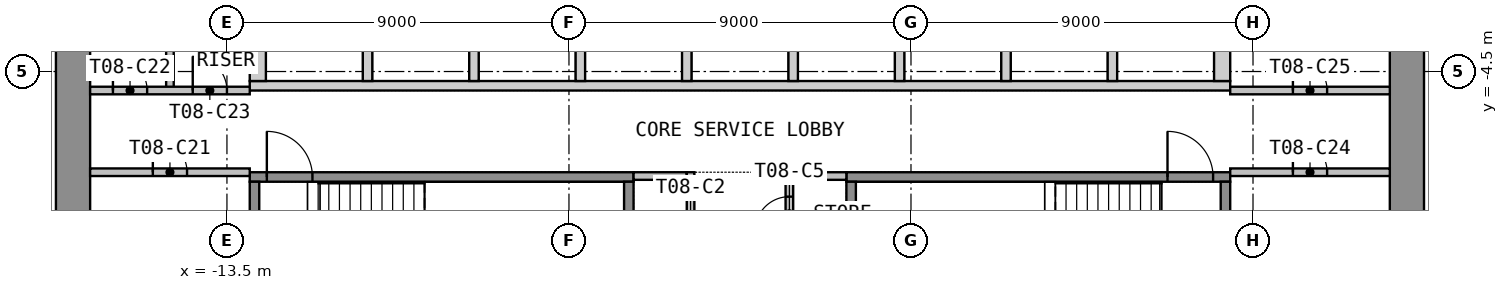
"""IFC4 building model, lengths in metres.
Left out: names, types, materials, properties, quantities, classifications, styles, units other than length and angle.
Written with IfcOpenShell. Run it as: python <this file> out.ifc"""

import sys

from ifc_helpers import new_model, si_unit, direction, frame, frame_2d, origin, place, context, subcontext, project, spatial, polyline, rectangle, outline, extrude, element, fill, save


model = new_model("IFC4")
c1 = context("Model", 3, precision=1e-05, world=origin(), true_north=direction((0.0, 1.0)))
c2 = subcontext(c1, "Body", "Model", "MODEL_VIEW")
j1 = project(units=[si_unit("LENGTHUNIT", "METRE"), si_unit("PLANEANGLEUNIT", "RADIAN")], contexts=[c1])
p1 = place(None, origin())
s1 = spatial("IfcSite", under=j1, at=p1, CompositionType="ELEMENT")
p2 = place(p1, origin())
s2 = spatial("IfcBuilding", under=s1, at=p2, CompositionType="ELEMENT")
p3 = place(p2, frame((0.0, 0.0, 116.4)))
s3 = spatial("IfcBuildingStorey", under=s2, at=p3, CompositionType="ELEMENT", Elevation=116.4)
p4 = place(p3, frame((-17.55, -12.6, 0.0), z_axis=(0.0, 0.0, 1.0), x_axis=(0.0, 1.0, 0.0)))
e1 = element("IfcWall", 1, at=p4, inside=s3, PredefinedType="SHEAR", context=c2, shape_type="SweptSolid", body=[
    extrude(rectangle(XDim=25.2, YDim=0.9, at=frame_2d((12.6, 0.0))), origin(), (0.0, 0.0, 1.0), 3.525),
])
p5 = place(p4, frame((11.4, 0.0, 0.0)))
e2 = element("IfcOpeningElement", 2, at=p5, cuts=e1, PredefinedType="OPENING", context=c2, shape_type="SweptSolid", body=[
    extrude(rectangle(XDim=2.4, YDim=2.1, at=frame_2d((1.2, 1.05))), frame((0.0, 0.46, 0.0), z_axis=(0.0, -1.0, 0.0), x_axis=(1.0, 0.0, 0.0)), (0.0, 0.0, 1.0), 0.92),
])
p6 = place(p3, frame((17.55, -12.6, 0.0), z_axis=(0.0, 0.0, 1.0), x_axis=(0.0, 1.0, 0.0)))
e3 = element("IfcWall", 3, at=p6, inside=s3, PredefinedType="SHEAR", context=c2, shape_type="SweptSolid", body=[
    extrude(rectangle(XDim=25.2, YDim=0.9, at=frame_2d((12.6, 0.0))), origin(), (0.0, 0.0, 1.0), 3.525),
])
p7 = place(p6, frame((11.4, 0.0, 0.0)))
e4 = element("IfcOpeningElement", 4, at=p7, cuts=e3, PredefinedType="OPENING", context=c2, shape_type="SweptSolid", body=[
    extrude(rectangle(XDim=2.4, YDim=2.1, at=frame_2d((1.2, 1.05))), frame((0.0, 0.46, 0.0), z_axis=(0.0, -1.0, 0.0), x_axis=(1.0, 0.0, 0.0)), (0.0, 0.0, 1.0), 0.92),
])
p8 = place(p3, origin())
e5 = element("IfcWall", 5, at=p8, inside=s3, PredefinedType="SHEAR", context=c2, shape_type="SweptSolid", body=[
    extrude(outline(polyline([(-12.9, -5.0), (12.9, -5.0), (12.9, -4.75), (-12.9, -4.75), (-12.9, -5.0)])), origin(), (0.0, 0.0, 1.0), 3.525),
])
p9 = place(p3, origin())
e6 = element("IfcWall", 6, at=p9, inside=s3, PredefinedType="SHEAR", context=c2, shape_type="SweptSolid", body=[
    extrude(outline(polyline([(-12.9, -4.75), (-12.475, -4.75), (-12.475, -2.05), (-12.9, -2.05), (-12.9, -4.75)])), origin(), (0.0, 0.0, 1.0), 3.525),
])
p10 = place(p3, origin())
e7 = element("IfcWall", 7, at=p10, inside=s3, PredefinedType="SHEAR", context=c2, shape_type="SweptSolid", body=[
    extrude(outline(polyline([(-9.925, -4.75), (-9.675, -4.75), (-9.675, -2.05), (-9.925, -2.05), (-9.925, -4.75)])), origin(), (0.0, 0.0, 1.0), 3.525),
])
p11 = place(p3, origin())
e8 = element("IfcWall", 8, at=p11, inside=s3, PredefinedType="SHEAR", context=c2, shape_type="SweptSolid", body=[
    extrude(outline(polyline([(-7.125, -4.75), (-6.875, -4.75), (-6.875, -2.05), (-7.125, -2.05), (-7.125, -4.75)])), origin(), (0.0, 0.0, 1.0), 3.525),
])
p12 = place(p3, origin())
e9 = element("IfcWall", 9, at=p12, inside=s3, PredefinedType="SHEAR", context=c2, shape_type="SweptSolid", body=[
    extrude(outline(polyline([(-4.325, -4.75), (-4.075, -4.75), (-4.075, -2.05), (-4.325, -2.05), (-4.325, -4.75)])), origin(), (0.0, 0.0, 1.0), 3.525),
])
p13 = place(p3, origin())
e10 = element("IfcWall", 10, at=p13, inside=s3, PredefinedType="SHEAR", context=c2, shape_type="SweptSolid", body=[
    extrude(outline(polyline([(-1.525, -4.75), (-1.275, -4.75), (-1.275, -2.05), (-1.525, -2.05), (-1.525, -4.75)])), origin(), (0.0, 0.0, 1.0), 3.525),
])
p14 = place(p3, origin())
e11 = element("IfcWall", 11, at=p14, inside=s3, PredefinedType="SHEAR", context=c2, shape_type="SweptSolid", body=[
    extrude(outline(polyline([(1.275, -4.75), (1.525, -4.75), (1.525, -2.05), (1.275, -2.05), (1.275, -4.75)])), origin(), (0.0, 0.0, 1.0), 3.525),
])
p15 = place(p3, origin())
e12 = element("IfcWall", 12, at=p15, inside=s3, PredefinedType="SHEAR", context=c2, shape_type="SweptSolid", body=[
    extrude(outline(polyline([(4.075, -4.75), (4.325, -4.75), (4.325, -2.05), (4.075, -2.05), (4.075, -4.75)])), origin(), (0.0, 0.0, 1.0), 3.525),
])
p16 = place(p3, origin())
e13 = element("IfcWall", 13, at=p16, inside=s3, PredefinedType="SHEAR", context=c2, shape_type="SweptSolid", body=[
    extrude(outline(polyline([(6.875, -4.75), (7.125, -4.75), (7.125, -2.05), (6.875, -2.05), (6.875, -4.75)])), origin(), (0.0, 0.0, 1.0), 3.525),
])
p17 = place(p3, origin())
e14 = element("IfcWall", 14, at=p17, inside=s3, PredefinedType="SHEAR", context=c2, shape_type="SweptSolid", body=[
    extrude(outline(polyline([(9.675, -4.75), (9.925, -4.75), (9.925, -2.05), (9.675, -2.05), (9.675, -4.75)])), origin(), (0.0, 0.0, 1.0), 3.525),
])
p18 = place(p3, origin())
e15 = element("IfcWall", 15, at=p18, inside=s3, PredefinedType="SHEAR", context=c2, shape_type="SweptSolid", body=[
    extrude(outline(polyline([(12.475, -4.75), (12.9, -4.75), (12.9, -2.05), (12.475, -2.05), (12.475, -4.75)])), origin(), (0.0, 0.0, 1.0), 3.525),
])
p19 = place(p3, frame((-12.9, -7.275, 0.0), z_axis=(0.0, 0.0, 1.0), x_axis=(1.0, 0.0, 0.0)))
e16 = element("IfcWall", 16, at=p19, inside=s3, PredefinedType="SHEAR", context=c2, shape_type="SweptSolid", body=[
    extrude(rectangle(XDim=10.1, YDim=0.25, at=frame_2d((5.05, 0.0))), origin(), (0.0, 0.0, 1.0), 3.525),
])
p20 = place(p19, frame((0.45, 0.0, 0.0)))
e17 = element("IfcOpeningElement", 17, at=p20, cuts=e16, PredefinedType="OPENING", context=c2, shape_type="SweptSolid", body=[
    extrude(rectangle(XDim=1.2, YDim=2.1, at=frame_2d((0.6, 1.05))), frame((0.0, 0.135, 0.0), z_axis=(0.0, -1.0, 0.0), x_axis=(1.0, 0.0, 0.0)), (0.0, 0.0, 1.0), 0.27),
])
for number, where, z_axis, x_axis in (
    (18, (-12.775, -10.65, 0.0), (0.0, 0.0, 1.0), (0.0, 1.0, 0.0)),
    (19, (-2.925, -10.65, 0.0), (0.0, 0.0, 1.0), (0.0, 1.0, 0.0)),
):
    element("IfcWall", number, at=place(p3, frame(where, z_axis=z_axis, x_axis=x_axis)), inside=s3, PredefinedType="SHEAR", context=c2, shape_type="SweptSolid", body=[
        extrude(rectangle(XDim=3.25, YDim=0.25, at=frame_2d((1.625, 0.0))), origin(), (0.0, 0.0, 1.0), 3.525),
    ])
p21 = place(p3, frame((2.8, -7.275, 0.0), z_axis=(0.0, 0.0, 1.0), x_axis=(1.0, 0.0, 0.0)))
e20 = element("IfcWall", 20, at=p21, inside=s3, PredefinedType="SHEAR", context=c2, shape_type="SweptSolid", body=[
    extrude(rectangle(XDim=10.1, YDim=0.25, at=frame_2d((5.05, 0.0))), origin(), (0.0, 0.0, 1.0), 3.525),
])
p22 = place(p21, frame((8.45, 0.0, 0.0)))
e21 = element("IfcOpeningElement", 21, at=p22, cuts=e20, PredefinedType="OPENING", context=c2, shape_type="SweptSolid", body=[
    extrude(rectangle(XDim=1.2, YDim=2.1, at=frame_2d((0.6, 1.05))), frame((0.0, 0.135, 0.0), z_axis=(0.0, -1.0, 0.0), x_axis=(1.0, 0.0, 0.0)), (0.0, 0.0, 1.0), 0.27),
])
for number, where, z_axis, x_axis in (
    (22, (2.925, -10.65, 0.0), (0.0, 0.0, 1.0), (0.0, 1.0, 0.0)),
    (23, (12.775, -10.65, 0.0), (0.0, 0.0, 1.0), (0.0, 1.0, 0.0)),
):
    element("IfcWall", number, at=place(p3, frame(where, z_axis=z_axis, x_axis=x_axis)), inside=s3, PredefinedType="SHEAR", context=c2, shape_type="SweptSolid", body=[
        extrude(rectangle(XDim=3.25, YDim=0.25, at=frame_2d((1.625, 0.0))), origin(), (0.0, 0.0, 1.0), 3.525),
    ])
for number, where, z_axis, x_axis in (
    (24, (-2.8, -7.25, 0.0), (0.0, 0.0, 1.0), (1.0, 0.0, 0.0)),
    (25, (1.4, -7.25, 0.0), (0.0, 0.0, 1.0), (1.0, 0.0, 0.0)),
):
    element("IfcWall", number, at=place(p3, frame(where, z_axis=z_axis, x_axis=x_axis)), inside=s3, PredefinedType="PARTITIONING", context=c2, shape_type="SweptSolid", body=[
        extrude(rectangle(XDim=1.4, YDim=0.2, at=frame_2d((0.7, 0.0))), origin(), (0.0, 0.0, 1.0), 3.525),
    ])
p23 = place(p3, frame((-1.3, -12.6, 0.0), z_axis=(0.0, 0.0, 1.0), x_axis=(0.0, 1.0, 0.0)))
e26 = element("IfcWall", 26, at=p23, inside=s3, PredefinedType="PARTITIONING", context=c2, shape_type="SweptSolid", body=[
    extrude(rectangle(XDim=5.45, YDim=0.2, at=frame_2d((2.725, 0.0))), origin(), (0.0, 0.0, 1.0), 3.525),
])
p24 = place(p23, frame((0.863, 0.0, 0.0)))
e27 = element("IfcOpeningElement", 27, at=p24, cuts=e26, PredefinedType="OPENING", context=c2, shape_type="SweptSolid", body=[
    extrude(rectangle(XDim=0.9, YDim=2.1, at=frame_2d((0.45, 1.05))), frame((0.0, 0.11, 0.0), z_axis=(0.0, -1.0, 0.0), x_axis=(1.0, 0.0, 0.0)), (0.0, 0.0, 1.0), 0.22),
])
p25 = place(p23, frame((3.488, 0.0, 0.0)))
e28 = element("IfcOpeningElement", 28, at=p25, cuts=e26, PredefinedType="OPENING", context=c2, shape_type="SweptSolid", body=[
    extrude(rectangle(XDim=0.9, YDim=2.1, at=frame_2d((0.45, 1.05))), frame((0.0, 0.11, 0.0), z_axis=(0.0, -1.0, 0.0), x_axis=(1.0, 0.0, 0.0)), (0.0, 0.0, 1.0), 0.22),
])
p26 = place(p3, frame((1.3, -12.6, 0.0), z_axis=(0.0, 0.0, 1.0), x_axis=(0.0, 1.0, 0.0)))
e29 = element("IfcWall", 29, at=p26, inside=s3, PredefinedType="PARTITIONING", context=c2, shape_type="SweptSolid", body=[
    extrude(rectangle(XDim=5.45, YDim=0.2, at=frame_2d((2.725, 0.0))), origin(), (0.0, 0.0, 1.0), 3.525),
])
p27 = place(p26, frame((0.416, 0.0, 0.0)))
e30 = element("IfcOpeningElement", 30, at=p27, cuts=e29, PredefinedType="OPENING", context=c2, shape_type="SweptSolid", body=[
    extrude(rectangle(XDim=0.9, YDim=2.1, at=frame_2d((0.45, 1.05))), frame((0.0, 0.11, 0.0), z_axis=(0.0, -1.0, 0.0), x_axis=(1.0, 0.0, 0.0)), (0.0, 0.0, 1.0), 0.22),
])
p28 = place(p26, frame((2.149, 0.0, 0.0)))
e31 = element("IfcOpeningElement", 31, at=p28, cuts=e29, PredefinedType="OPENING", context=c2, shape_type="SweptSolid", body=[
    extrude(rectangle(XDim=0.9, YDim=2.1, at=frame_2d((0.45, 1.05))), frame((0.0, 0.11, 0.0), z_axis=(0.0, -1.0, 0.0), x_axis=(1.0, 0.0, 0.0)), (0.0, 0.0, 1.0), 0.22),
])
p29 = place(p26, frame((3.907, 0.0, 0.0)))
e32 = element("IfcOpeningElement", 32, at=p29, cuts=e29, PredefinedType="OPENING", context=c2, shape_type="SweptSolid", body=[
    extrude(rectangle(XDim=0.9, YDim=2.1, at=frame_2d((0.45, 1.05))), frame((0.0, 0.11, 0.0), z_axis=(0.0, -1.0, 0.0), x_axis=(1.0, 0.0, 0.0)), (0.0, 0.0, 1.0), 0.22),
])
p30 = place(p3, frame((-17.1, -7.15, 0.0), z_axis=(0.0, 0.0, 1.0), x_axis=(1.0, 0.0, 0.0)))
e33 = element("IfcWall", 33, at=p30, inside=s3, PredefinedType="PARTITIONING", context=c2, shape_type="SweptSolid", body=[
    extrude(rectangle(XDim=4.2, YDim=0.2, at=frame_2d((2.1, 0.0))), origin(), (0.0, 0.0, 1.0), 3.525),
])
p31 = place(p30, frame((1.65, 0.0, 0.0)))
e34 = element("IfcOpeningElement", 34, at=p31, cuts=e33, PredefinedType="OPENING", context=c2, shape_type="SweptSolid", body=[
    extrude(rectangle(XDim=0.9, YDim=2.1, at=frame_2d((0.45, 1.05))), frame((0.0, 0.11, 0.0), z_axis=(0.0, -1.0, 0.0), x_axis=(1.0, 0.0, 0.0)), (0.0, 0.0, 1.0), 0.22),
])
p32 = place(p3, frame((-15.0, -5.0, 0.0), z_axis=(0.0, 0.0, 1.0), x_axis=(0.0, 1.0, 0.0)))
e35 = element("IfcWall", 35, at=p32, inside=s3, PredefinedType="PARTITIONING", context=c2, shape_type="SweptSolid", body=[
    extrude(rectangle(XDim=3.2, YDim=0.2, at=frame_2d((1.6, 0.0))), origin(), (0.0, 0.0, 1.0), 3.525),
])
p33 = place(p3, frame((-17.1, -5.0, 0.0), z_axis=(0.0, 0.0, 1.0), x_axis=(1.0, 0.0, 0.0)))
e36 = element("IfcWall", 36, at=p33, inside=s3, PredefinedType="PARTITIONING", context=c2, shape_type="SweptSolid", body=[
    extrude(rectangle(XDim=4.2, YDim=0.2, at=frame_2d((2.1, 0.0))), origin(), (0.0, 0.0, 1.0), 3.525),
])
p34 = place(p33, frame((0.6, 0.0, 0.0)))
e37 = element("IfcOpeningElement", 37, at=p34, cuts=e36, PredefinedType="OPENING", context=c2, shape_type="SweptSolid", body=[
    extrude(rectangle(XDim=0.9, YDim=2.1, at=frame_2d((0.45, 1.05))), frame((0.0, 0.11, 0.0), z_axis=(0.0, -1.0, 0.0), x_axis=(1.0, 0.0, 0.0)), (0.0, 0.0, 1.0), 0.22),
])
p35 = place(p33, frame((2.7, 0.0, 0.0)))
e38 = element("IfcOpeningElement", 38, at=p35, cuts=e36, PredefinedType="OPENING", context=c2, shape_type="SweptSolid", body=[
    extrude(rectangle(XDim=0.9, YDim=2.1, at=frame_2d((0.45, 1.05))), frame((0.0, 0.11, 0.0), z_axis=(0.0, -1.0, 0.0), x_axis=(1.0, 0.0, 0.0)), (0.0, 0.0, 1.0), 0.22),
])
p36 = place(p3, frame((12.9, -7.15, 0.0), z_axis=(0.0, 0.0, 1.0), x_axis=(1.0, 0.0, 0.0)))
e39 = element("IfcWall", 39, at=p36, inside=s3, PredefinedType="PARTITIONING", context=c2, shape_type="SweptSolid", body=[
    extrude(rectangle(XDim=4.2, YDim=0.2, at=frame_2d((2.1, 0.0))), origin(), (0.0, 0.0, 1.0), 3.525),
])
p37 = place(p36, frame((1.65, 0.0, 0.0)))
e40 = element("IfcOpeningElement", 40, at=p37, cuts=e39, PredefinedType="OPENING", context=c2, shape_type="SweptSolid", body=[
    extrude(rectangle(XDim=0.9, YDim=2.1, at=frame_2d((0.45, 1.05))), frame((0.0, 0.11, 0.0), z_axis=(0.0, -1.0, 0.0), x_axis=(1.0, 0.0, 0.0)), (0.0, 0.0, 1.0), 0.22),
])
p38 = place(p3, frame((12.9, -5.0, 0.0), z_axis=(0.0, 0.0, 1.0), x_axis=(1.0, 0.0, 0.0)))
e41 = element("IfcWall", 41, at=p38, inside=s3, PredefinedType="PARTITIONING", context=c2, shape_type="SweptSolid", body=[
    extrude(rectangle(XDim=4.2, YDim=0.2, at=frame_2d((2.1, 0.0))), origin(), (0.0, 0.0, 1.0), 3.525),
])
p39 = place(p38, frame((1.65, 0.0, 0.0)))
e42 = element("IfcOpeningElement", 42, at=p39, cuts=e41, PredefinedType="OPENING", context=c2, shape_type="SweptSolid", body=[
    extrude(rectangle(XDim=0.9, YDim=2.1, at=frame_2d((0.45, 1.05))), frame((0.0, 0.11, 0.0), z_axis=(0.0, -1.0, 0.0), x_axis=(1.0, 0.0, 0.0)), (0.0, 0.0, 1.0), 0.22),
])
p40 = place(p20, origin())
e43 = element("IfcDoor", 43, at=p40, inside=s3, OperationType="SINGLE_SWING_LEFT", PredefinedType="DOOR", context=c2, shape_type="SweptSolid", body=[
    extrude(rectangle(XDim=1.2, YDim=2.1, at=frame_2d((0.6, 1.05))), frame((0.0, 0.025, 0.0), z_axis=(0.0, -1.0, 0.0), x_axis=(1.0, 0.0, 0.0)), (0.0, 0.0, 1.0), 0.05),
])
fill(e17, e43)
p41 = place(p22, origin())
e44 = element("IfcDoor", 44, at=p41, inside=s3, OperationType="SINGLE_SWING_LEFT", PredefinedType="DOOR", context=c2, shape_type="SweptSolid", body=[
    extrude(rectangle(XDim=1.2, YDim=2.1, at=frame_2d((0.6, 1.05))), frame((0.0, 0.025, 0.0), z_axis=(0.0, -1.0, 0.0), x_axis=(1.0, 0.0, 0.0)), (0.0, 0.0, 1.0), 0.05),
])
fill(e21, e44)
p42 = place(p29, origin())
e45 = element("IfcDoor", 45, at=p42, inside=s3, OperationType="SINGLE_SWING_LEFT", PredefinedType="DOOR", context=c2, shape_type="SweptSolid", body=[
    extrude(rectangle(XDim=0.9, YDim=2.1, at=frame_2d((0.45, 1.05))), frame((0.0, 0.025, 0.0), z_axis=(0.0, -1.0, 0.0), x_axis=(1.0, 0.0, 0.0)), (0.0, 0.0, 1.0), 0.05),
])
fill(e32, e45)
p43 = place(p31, origin())
e46 = element("IfcDoor", 46, at=p43, inside=s3, OperationType="SINGLE_SWING_LEFT", PredefinedType="DOOR", context=c2, shape_type="SweptSolid", body=[
    extrude(rectangle(XDim=0.9, YDim=2.1, at=frame_2d((0.45, 1.05))), frame((0.0, 0.025, 0.0), z_axis=(0.0, -1.0, 0.0), x_axis=(1.0, 0.0, 0.0)), (0.0, 0.0, 1.0), 0.05),
])
fill(e34, e46)
p44 = place(p34, origin())
e47 = element("IfcDoor", 47, at=p44, inside=s3, OperationType="SINGLE_SWING_LEFT", PredefinedType="DOOR", context=c2, shape_type="SweptSolid", body=[
    extrude(rectangle(XDim=0.9, YDim=2.1, at=frame_2d((0.45, 1.05))), frame((0.0, 0.025, 0.0), z_axis=(0.0, -1.0, 0.0), x_axis=(1.0, 0.0, 0.0)), (0.0, 0.0, 1.0), 0.05),
])
fill(e37, e47)
p45 = place(p35, origin())
e48 = element("IfcDoor", 48, at=p45, inside=s3, OperationType="SINGLE_SWING_LEFT", PredefinedType="DOOR", context=c2, shape_type="SweptSolid", body=[
    extrude(rectangle(XDim=0.9, YDim=2.1, at=frame_2d((0.45, 1.05))), frame((0.0, 0.025, 0.0), z_axis=(0.0, -1.0, 0.0), x_axis=(1.0, 0.0, 0.0)), (0.0, 0.0, 1.0), 0.05),
])
fill(e38, e48)
p46 = place(p37, origin())
e49 = element("IfcDoor", 49, at=p46, inside=s3, OperationType="SINGLE_SWING_LEFT", PredefinedType="DOOR", context=c2, shape_type="SweptSolid", body=[
    extrude(rectangle(XDim=0.9, YDim=2.1, at=frame_2d((0.45, 1.05))), frame((0.0, 0.025, 0.0), z_axis=(0.0, -1.0, 0.0), x_axis=(1.0, 0.0, 0.0)), (0.0, 0.0, 1.0), 0.05),
])
fill(e40, e49)
p47 = place(p39, origin())
e50 = element("IfcDoor", 50, at=p47, inside=s3, OperationType="SINGLE_SWING_LEFT", PredefinedType="DOOR", context=c2, shape_type="SweptSolid", body=[
    extrude(rectangle(XDim=0.9, YDim=2.1, at=frame_2d((0.45, 1.05))), frame((0.0, 0.025, 0.0), z_axis=(0.0, -1.0, 0.0), x_axis=(1.0, 0.0, 0.0)), (0.0, 0.0, 1.0), 0.05),
])
fill(e42, e50)
save(model, sys.argv[1])
